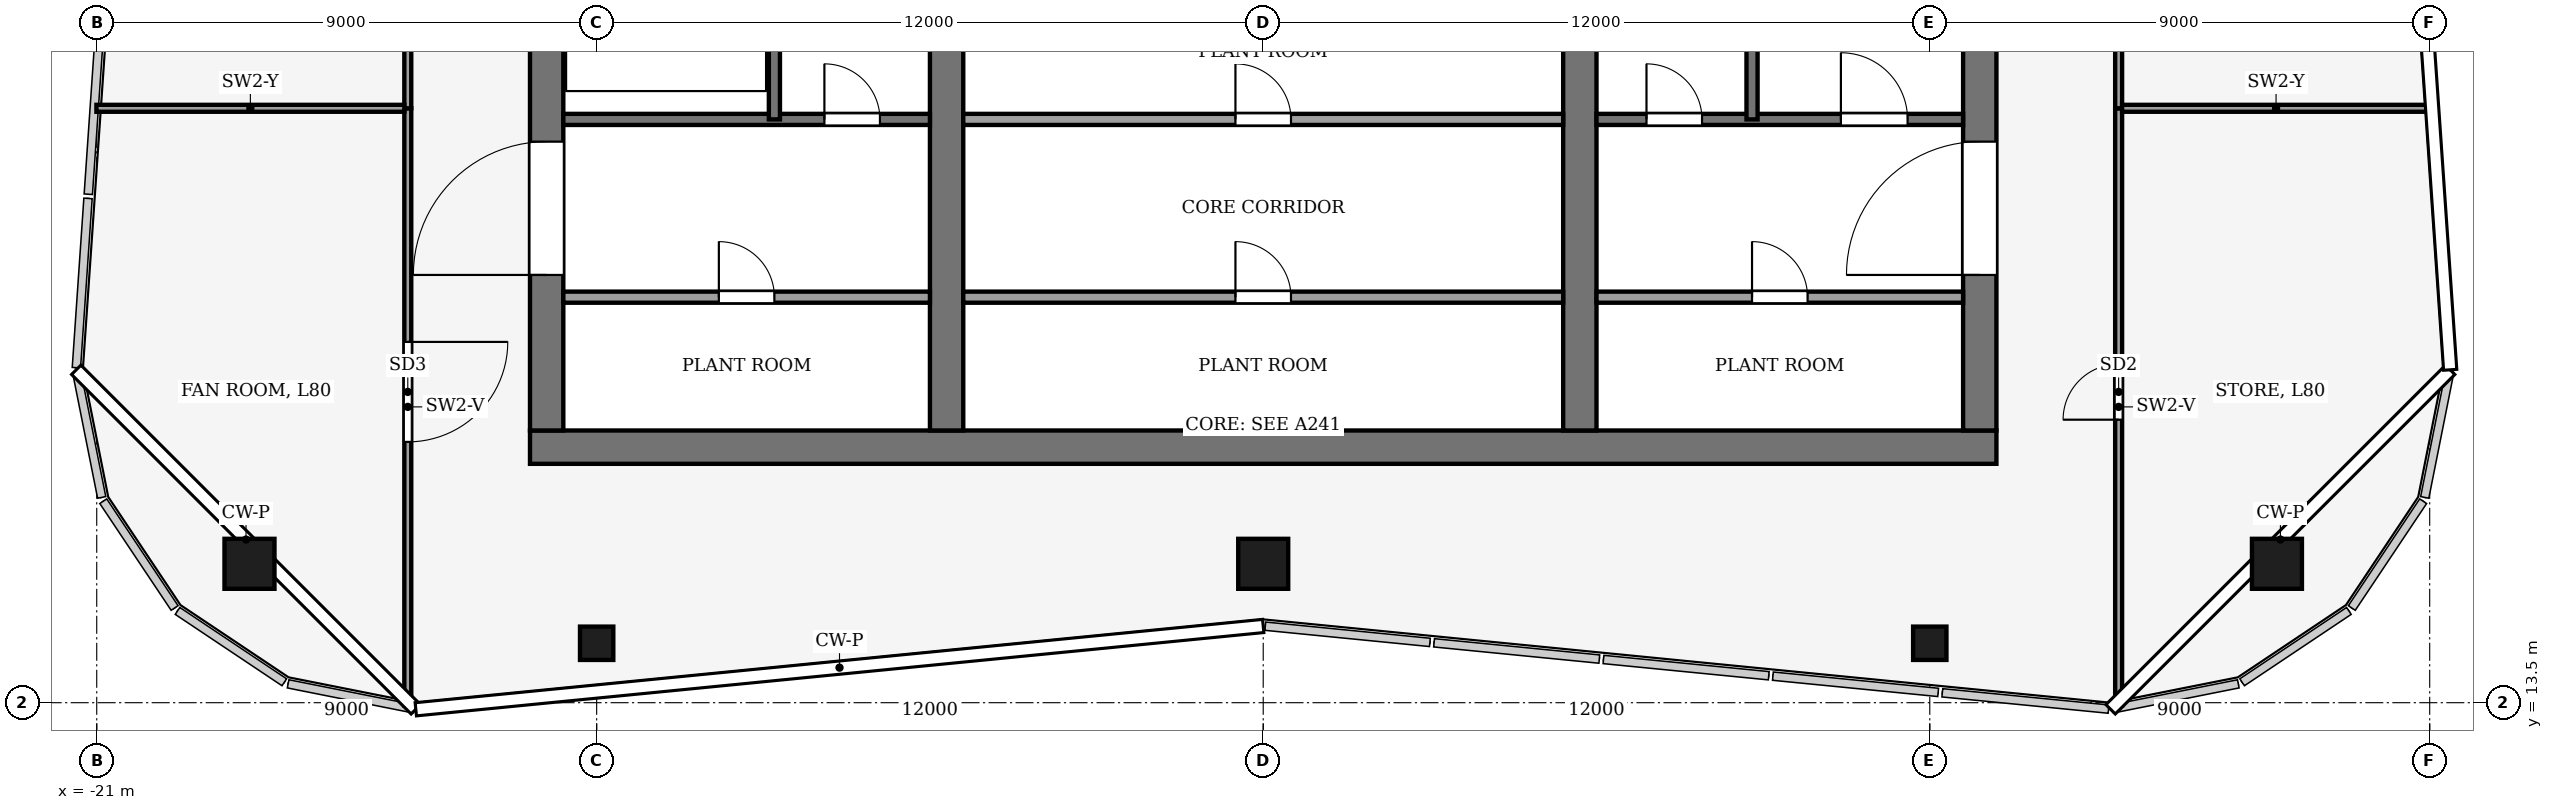
"""IFC4 building model, lengths in metres.
Left out: names, types, materials, properties, quantities, classifications, styles, units other than length and angle.
Written with IfcOpenShell. Run it as: python <this file> out.ifc"""

import sys

from ifc_helpers import new_model, si_unit, direction, frame, frame_2d, origin, origin_2d, place, context, subcontext, project, spatial, rectangle, hollow_rectangle, extrude, element, fill, save


model = new_model("IFC4")
c1 = context("Model", 3, precision=1e-05, world=origin(), true_north=direction((0.0, 1.0)))
c2 = subcontext(c1, "Body", "Model", "MODEL_VIEW")
j1 = project(units=[si_unit("LENGTHUNIT", "METRE"), si_unit("PLANEANGLEUNIT", "RADIAN")], contexts=[c1])
p1 = place(None, origin())
s1 = spatial("IfcSite", under=j1, at=p1, CompositionType="ELEMENT")
p2 = place(p1, origin())
s2 = spatial("IfcBuilding", under=s1, at=p2, CompositionType="ELEMENT")
p3 = place(p2, frame((0.0, 0.0, 354.5)))
s3 = spatial("IfcBuildingStorey", under=s2, at=p3, CompositionType="ELEMENT", Elevation=354.5)
p4 = place(p3, frame((-13.2, 18.1, -0.15), z_axis=(0.0, 0.0, 1.0), x_axis=(1.0, 0.0, 0.0)))
e1 = element("IfcWall", 1, at=p4, inside=s3, PredefinedType="SHEAR", context=c2, shape_type="SweptSolid", body=[
    extrude(rectangle(XDim=26.4, YDim=0.6, at=frame_2d((13.2, 0.0))), origin(), (0.0, 0.0, 1.0), 5.0),
])
p5 = place(p3, frame((-12.9, 18.4, -0.15), z_axis=(0.0, 0.0, 1.0), x_axis=(0.0, 1.0, 0.0)))
e2 = element("IfcWall", 2, at=p5, inside=s3, PredefinedType="SHEAR", context=c2, shape_type="SweptSolid", body=[
    extrude(rectangle(XDim=19.2, YDim=0.6, at=frame_2d((9.6, 0.0))), origin(), (0.0, 0.0, 1.0), 5.0),
])
p6 = place(p5, frame((2.8, 0.0, 0.15)))
e3 = element("IfcOpeningElement", 3, at=p6, cuts=e2, PredefinedType="OPENING", context=c2, shape_type="SweptSolid", body=[
    extrude(rectangle(XDim=2.4, YDim=2.4, at=frame_2d((1.2, 1.2))), frame((0.0, 0.31, 0.0), z_axis=(0.0, -1.0, 0.0), x_axis=(1.0, 0.0, 0.0)), (0.0, 0.0, 1.0), 0.62),
])
p7 = place(p5, frame((13.4, 0.0, 0.15)))
e4 = element("IfcOpeningElement", 4, at=p7, cuts=e2, PredefinedType="OPENING", context=c2, shape_type="SweptSolid", body=[
    extrude(rectangle(XDim=1.4, YDim=2.2, at=frame_2d((0.7, 1.1))), frame((0.0, 0.31, 0.0), z_axis=(0.0, -1.0, 0.0), x_axis=(1.0, 0.0, 0.0)), (0.0, 0.0, 1.0), 0.62),
])
p8 = place(p3, frame((12.9, 18.4, -0.15), z_axis=(0.0, 0.0, 1.0), x_axis=(0.0, 1.0, 0.0)))
e5 = element("IfcWall", 5, at=p8, inside=s3, PredefinedType="SHEAR", context=c2, shape_type="SweptSolid", body=[
    extrude(rectangle(XDim=19.2, YDim=0.6, at=frame_2d((9.6, 0.0))), origin(), (0.0, 0.0, 1.0), 5.0),
])
p9 = place(p8, frame((2.8, 0.0, 0.15)))
e6 = element("IfcOpeningElement", 6, at=p9, cuts=e5, PredefinedType="OPENING", context=c2, shape_type="SweptSolid", body=[
    extrude(rectangle(XDim=2.4, YDim=2.4, at=frame_2d((1.2, 1.2))), frame((0.0, 0.31, 0.0), z_axis=(0.0, -1.0, 0.0), x_axis=(1.0, 0.0, 0.0)), (0.0, 0.0, 1.0), 0.62),
])
p10 = place(p8, frame((13.3, 0.0, 0.15)))
e7 = element("IfcOpeningElement", 7, at=p10, cuts=e5, PredefinedType="OPENING", context=c2, shape_type="SweptSolid", body=[
    extrude(rectangle(XDim=2.4, YDim=2.4, at=frame_2d((1.2, 1.2))), frame((0.0, 0.31, 0.0), z_axis=(0.0, -1.0, 0.0), x_axis=(1.0, 0.0, 0.0)), (0.0, 0.0, 1.0), 0.62),
])
p11 = place(p3, frame((-5.7, 18.4, -0.15), z_axis=(0.0, 0.0, 1.0), x_axis=(0.0, 1.0, 0.0)))
e8 = element("IfcWall", 8, at=p11, inside=s3, PredefinedType="SHEAR", context=c2, shape_type="SweptSolid", body=[
    extrude(rectangle(XDim=19.2, YDim=0.6, at=frame_2d((9.6, 0.0))), origin(), (0.0, 0.0, 1.0), 5.0),
])
p12 = place(p11, frame((8.35, 0.0, 0.15)))
e9 = element("IfcOpeningElement", 9, at=p12, cuts=e8, PredefinedType="OPENING", context=c2, shape_type="SweptSolid", body=[
    extrude(rectangle(XDim=0.9, YDim=2.1, at=frame_2d((0.45, 1.05))), frame((0.0, 0.31, 0.0), z_axis=(0.0, -1.0, 0.0), x_axis=(1.0, 0.0, 0.0)), (0.0, 0.0, 1.0), 0.62),
])
p13 = place(p3, frame((5.7, 18.4, -0.15), z_axis=(0.0, 0.0, 1.0), x_axis=(0.0, 1.0, 0.0)))
e10 = element("IfcWall", 10, at=p13, inside=s3, PredefinedType="SHEAR", context=c2, shape_type="SweptSolid", body=[
    extrude(rectangle(XDim=19.2, YDim=0.6, at=frame_2d((9.6, 0.0))), origin(), (0.0, 0.0, 1.0), 5.0),
])
p14 = place(p13, frame((13.3, 0.0, 0.15)))
e11 = element("IfcOpeningElement", 11, at=p14, cuts=e10, PredefinedType="OPENING", context=c2, shape_type="SweptSolid", body=[
    extrude(rectangle(XDim=2.4, YDim=2.4, at=frame_2d((1.2, 1.2))), frame((0.0, 0.31, 0.0), z_axis=(0.0, -1.0, 0.0), x_axis=(1.0, 0.0, 0.0)), (0.0, 0.0, 1.0), 0.62),
])
for number, where, z_axis, x_axis in (
    (12, (18.25, 16.0, 0.0), (0.0, 0.0, 1.0), (1.0, 0.0, 0.0)),
    (13, (0.0, 16.0, 0.0), (0.0, 0.0, 1.0), (1.0, 0.0, 0.0)),
    (14, (-18.25, 16.0, 0.0), (0.0, 0.0, 1.0), (1.0, 0.0, 0.0)),
):
    element("IfcColumn", number, at=place(p3, frame(where, z_axis=z_axis, x_axis=x_axis)), inside=s3, PredefinedType="COLUMN", context=c2, shape_type="SweptSolid", body=[
        extrude(hollow_rectangle(XDim=0.9, YDim=0.9, WallThickness=0.04, at=origin_2d()), origin(), (0.0, 0.0, 1.0), 5.0),
    ])
for number, where, z_axis, x_axis in (
    (15, (-12.0, 14.57, 0.0), (0.0, 0.0, 1.0), (1.0, 0.0, 0.0)),
    (16, (12.0, 14.57, 0.0), (0.0, 0.0, 1.0), (1.0, 0.0, 0.0)),
):
    element("IfcColumn", number, at=place(p3, frame(where, z_axis=z_axis, x_axis=x_axis)), inside=s3, PredefinedType="COLUMN", context=c2, shape_type="SweptSolid", body=[
        extrude(hollow_rectangle(XDim=0.6, YDim=0.6, WallThickness=0.025, at=origin_2d()), origin(), (0.0, 0.0, 1.0), 5.0),
    ])
p15 = place(p3, frame((-12.6, 20.8, 0.0), z_axis=(0.0, 0.0, 1.0), x_axis=(1.0, 0.0, 0.0)))
e17 = element("IfcWall", 17, at=p15, inside=s3, PredefinedType="PARTITIONING", context=c2, shape_type="SweptSolid", body=[
    extrude(rectangle(XDim=6.6, YDim=0.2, at=frame_2d((3.3, 0.0))), origin(), (0.0, 0.0, 1.0), 4.85),
])
p16 = place(p15, frame((2.8, 0.0, 0.0)))
e18 = element("IfcOpeningElement", 18, at=p16, cuts=e17, PredefinedType="OPENING", context=c2, shape_type="SweptSolid", body=[
    extrude(rectangle(XDim=1.0, YDim=2.1, at=frame_2d((0.5, 1.05))), frame((0.0, 0.11, 0.0), z_axis=(0.0, -1.0, 0.0), x_axis=(1.0, 0.0, 0.0)), (0.0, 0.0, 1.0), 0.22),
])
p17 = place(p3, frame((-5.4, 20.8, 0.0), z_axis=(0.0, 0.0, 1.0), x_axis=(1.0, 0.0, 0.0)))
e19 = element("IfcWall", 19, at=p17, inside=s3, PredefinedType="PARTITIONING", context=c2, shape_type="SweptSolid", body=[
    extrude(rectangle(XDim=10.8, YDim=0.2, at=frame_2d((5.4, 0.0))), origin(), (0.0, 0.0, 1.0), 4.85),
])
p18 = place(p17, frame((4.9, 0.0, 0.0)))
e20 = element("IfcOpeningElement", 20, at=p18, cuts=e19, PredefinedType="OPENING", context=c2, shape_type="SweptSolid", body=[
    extrude(rectangle(XDim=1.0, YDim=2.1, at=frame_2d((0.5, 1.05))), frame((0.0, 0.11, 0.0), z_axis=(0.0, -1.0, 0.0), x_axis=(1.0, 0.0, 0.0)), (0.0, 0.0, 1.0), 0.22),
])
p19 = place(p3, frame((6.0, 20.8, 0.0), z_axis=(0.0, 0.0, 1.0), x_axis=(1.0, 0.0, 0.0)))
e21 = element("IfcWall", 21, at=p19, inside=s3, PredefinedType="PARTITIONING", context=c2, shape_type="SweptSolid", body=[
    extrude(rectangle(XDim=6.6, YDim=0.2, at=frame_2d((3.3, 0.0))), origin(), (0.0, 0.0, 1.0), 4.85),
])
p20 = place(p19, frame((2.8, 0.0, 0.0)))
e22 = element("IfcOpeningElement", 22, at=p20, cuts=e21, PredefinedType="OPENING", context=c2, shape_type="SweptSolid", body=[
    extrude(rectangle(XDim=1.0, YDim=2.1, at=frame_2d((0.5, 1.05))), frame((0.0, 0.11, 0.0), z_axis=(0.0, -1.0, 0.0), x_axis=(1.0, 0.0, 0.0)), (0.0, 0.0, 1.0), 0.22),
])
p21 = place(p3, frame((-12.6, 24.0, 0.0), z_axis=(0.0, 0.0, 1.0), x_axis=(1.0, 0.0, 0.0)))
e23 = element("IfcWall", 23, at=p21, inside=s3, PredefinedType="PARTITIONING", context=c2, shape_type="SweptSolid", body=[
    extrude(rectangle(XDim=6.6, YDim=0.2, at=frame_2d((3.3, 0.0))), origin(), (0.0, 0.0, 1.0), 4.85),
])
p22 = place(p21, frame((4.7, 0.0, 0.0)))
e24 = element("IfcOpeningElement", 24, at=p22, cuts=e23, PredefinedType="OPENING", context=c2, shape_type="SweptSolid", body=[
    extrude(rectangle(XDim=1.0, YDim=2.1, at=frame_2d((0.5, 1.05))), frame((0.0, 0.11, 0.0), z_axis=(0.0, -1.0, 0.0), x_axis=(1.0, 0.0, 0.0)), (0.0, 0.0, 1.0), 0.22),
])
p23 = place(p3, frame((-5.4, 24.0, 0.0), z_axis=(0.0, 0.0, 1.0), x_axis=(1.0, 0.0, 0.0)))
e25 = element("IfcWall", 25, at=p23, inside=s3, PredefinedType="PARTITIONING", context=c2, shape_type="SweptSolid", body=[
    extrude(rectangle(XDim=10.8, YDim=0.2, at=frame_2d((5.4, 0.0))), origin(), (0.0, 0.0, 1.0), 4.85),
])
p24 = place(p23, frame((4.9, 0.0, 0.0)))
e26 = element("IfcOpeningElement", 26, at=p24, cuts=e25, PredefinedType="OPENING", context=c2, shape_type="SweptSolid", body=[
    extrude(rectangle(XDim=1.0, YDim=2.1, at=frame_2d((0.5, 1.05))), frame((0.0, 0.11, 0.0), z_axis=(0.0, -1.0, 0.0), x_axis=(1.0, 0.0, 0.0)), (0.0, 0.0, 1.0), 0.22),
])
p25 = place(p3, frame((6.0, 24.0, 0.0), z_axis=(0.0, 0.0, 1.0), x_axis=(1.0, 0.0, 0.0)))
e27 = element("IfcWall", 27, at=p25, inside=s3, PredefinedType="PARTITIONING", context=c2, shape_type="SweptSolid", body=[
    extrude(rectangle(XDim=6.6, YDim=0.2, at=frame_2d((3.3, 0.0))), origin(), (0.0, 0.0, 1.0), 4.85),
])
p26 = place(p25, frame((0.9, 0.0, 0.0)))
e28 = element("IfcOpeningElement", 28, at=p26, cuts=e27, PredefinedType="OPENING", context=c2, shape_type="SweptSolid", body=[
    extrude(rectangle(XDim=1.0, YDim=2.1, at=frame_2d((0.5, 1.05))), frame((0.0, 0.11, 0.0), z_axis=(0.0, -1.0, 0.0), x_axis=(1.0, 0.0, 0.0)), (0.0, 0.0, 1.0), 0.22),
])
p27 = place(p25, frame((4.4, 0.0, 0.0)))
e29 = element("IfcOpeningElement", 29, at=p27, cuts=e27, PredefinedType="OPENING", context=c2, shape_type="SweptSolid", body=[
    extrude(rectangle(XDim=1.2, YDim=2.2, at=frame_2d((0.6, 1.1))), frame((0.0, 0.11, 0.0), z_axis=(0.0, -1.0, 0.0), x_axis=(1.0, 0.0, 0.0)), (0.0, 0.0, 1.0), 0.22),
])
for number, where, z_axis, x_axis in (
    (30, (-8.8, 24.0, 0.0), (0.0, 0.0, 1.0), (0.0, 1.0, 0.0)),
    (31, (8.8, 24.0, 0.0), (0.0, 0.0, 1.0), (0.0, 1.0, 0.0)),
):
    element("IfcWall", number, at=place(p3, frame(where, z_axis=z_axis, x_axis=x_axis)), inside=s3, PredefinedType="PARTITIONING", context=c2, shape_type="SweptSolid", body=[
        extrude(rectangle(XDim=7.4, YDim=0.2, at=frame_2d((3.7, 0.0))), origin(), (0.0, 0.0, 1.0), 4.85),
    ])
p28 = place(p3, frame((-15.4, 24.2, 0.0), z_axis=(0.0, 0.0, 1.0), x_axis=(0.0, -1.0, 0.0)))
e32 = element("IfcWall", 32, at=p28, inside=s3, PredefinedType="PARTITIONING", context=c2, shape_type="SweptSolid", body=[
    extrude(rectangle(XDim=10.75, YDim=0.125, at=frame_2d((5.375, 0.0))), origin(), (0.0, 0.0, 1.0), 3.812),
])
p29 = place(p28, frame((4.206, 0.0, 0.0)))
e33 = element("IfcOpeningElement", 33, at=p29, cuts=e32, PredefinedType="OPENING", context=c2, shape_type="SweptSolid", body=[
    extrude(rectangle(XDim=1.8, YDim=2.4, at=frame_2d((0.9, 1.2))), frame((0.0, 0.073, 0.0), z_axis=(0.0, -1.0, 0.0), x_axis=(1.0, 0.0, 0.0)), (0.0, 0.0, 1.0), 0.145),
])
p30 = place(p3, frame((-15.4, 34.4, 0.0), z_axis=(0.0, 0.0, 1.0), x_axis=(0.0, -1.0, 0.0)))
e34 = element("IfcWall", 34, at=p30, inside=s3, PredefinedType="PARTITIONING", context=c2, shape_type="SweptSolid", body=[
    extrude(rectangle(XDim=10.2, YDim=0.125, at=frame_2d((5.1, 0.0))), origin(), (0.0, 0.0, 1.0), 4.52),
])
p31 = place(p30, frame((4.6, 0.0, 0.0)))
e35 = element("IfcOpeningElement", 35, at=p31, cuts=e34, PredefinedType="OPENING", context=c2, shape_type="SweptSolid", body=[
    extrude(rectangle(XDim=1.0, YDim=2.1, at=frame_2d((0.5, 1.05))), frame((0.0, 0.073, 0.0), z_axis=(0.0, -1.0, 0.0), x_axis=(1.0, 0.0, 0.0)), (0.0, 0.0, 1.0), 0.145),
])
p32 = place(p3, frame((15.4, 13.45, 0.0), z_axis=(0.0, 0.0, 1.0), x_axis=(0.0, 1.0, 0.0)))
e36 = element("IfcWall", 36, at=p32, inside=s3, PredefinedType="PARTITIONING", context=c2, shape_type="SweptSolid", body=[
    extrude(rectangle(XDim=10.75, YDim=0.125, at=frame_2d((5.375, 0.0))), origin(), (0.0, 0.0, 1.0), 3.812),
])
p33 = place(p32, frame((5.145, 0.0, 0.0)))
e37 = element("IfcOpeningElement", 37, at=p33, cuts=e36, PredefinedType="OPENING", context=c2, shape_type="SweptSolid", body=[
    extrude(rectangle(XDim=1.0, YDim=2.1, at=frame_2d((0.5, 1.05))), frame((0.0, 0.073, 0.0), z_axis=(0.0, -1.0, 0.0), x_axis=(1.0, 0.0, 0.0)), (0.0, 0.0, 1.0), 0.145),
])
p34 = place(p3, frame((15.4, 24.2, 0.0), z_axis=(0.0, 0.0, 1.0), x_axis=(0.0, 1.0, 0.0)))
e38 = element("IfcWall", 38, at=p34, inside=s3, PredefinedType="PARTITIONING", context=c2, shape_type="SweptSolid", body=[
    extrude(rectangle(XDim=10.2, YDim=0.125, at=frame_2d((5.1, 0.0))), origin(), (0.0, 0.0, 1.0), 4.52),
])
p35 = place(p34, frame((4.2, 0.0, 0.0)))
e39 = element("IfcOpeningElement", 39, at=p35, cuts=e38, PredefinedType="OPENING", context=c2, shape_type="SweptSolid", body=[
    extrude(rectangle(XDim=1.8, YDim=2.4, at=frame_2d((0.9, 1.2))), frame((0.0, 0.073, 0.0), z_axis=(0.0, -1.0, 0.0), x_axis=(1.0, 0.0, 0.0)), (0.0, 0.0, 1.0), 0.145),
])
for number, where, z_axis, x_axis in (
    (40, (-21.006, 24.2, 0.0), (0.0, 0.0, 1.0), (1.0, 0.0, 0.0)),
    (41, (15.462, 24.2, 0.0), (0.0, 0.0, 1.0), (1.0, 0.0, 0.0)),
):
    element("IfcWall", number, at=place(p3, frame(where, z_axis=z_axis, x_axis=x_axis)), inside=s3, PredefinedType="PARTITIONING", context=c2, shape_type="SweptSolid", body=[
        extrude(rectangle(XDim=5.543, YDim=0.125, at=frame_2d((2.772, 0.0))), origin(), (0.0, 0.0, 1.0), 4.02),
    ])
p36 = place(p18, origin())
e42 = element("IfcDoor", 42, at=p36, inside=s3, OperationType="SINGLE_SWING_LEFT", PredefinedType="DOOR", context=c2, shape_type="SweptSolid", body=[
    extrude(rectangle(XDim=1.0, YDim=2.1, at=frame_2d((0.5, 1.05))), frame((0.0, 0.025, 0.0), z_axis=(0.0, -1.0, 0.0), x_axis=(1.0, 0.0, 0.0)), (0.0, 0.0, 1.0), 0.05),
])
fill(e20, e42)
p37 = place(p24, origin())
e43 = element("IfcDoor", 43, at=p37, inside=s3, OperationType="SINGLE_SWING_RIGHT", PredefinedType="DOOR", context=c2, shape_type="SweptSolid", body=[
    extrude(rectangle(XDim=1.0, YDim=2.1, at=frame_2d((0.5, 1.05))), frame((0.0, 0.025, 0.0), z_axis=(0.0, -1.0, 0.0), x_axis=(1.0, 0.0, 0.0)), (0.0, 0.0, 1.0), 0.05),
])
fill(e26, e43)
p38 = place(p16, origin())
e44 = element("IfcDoor", 44, at=p38, inside=s3, OperationType="SINGLE_SWING_RIGHT", PredefinedType="DOOR", context=c2, shape_type="SweptSolid", body=[
    extrude(rectangle(XDim=1.0, YDim=2.1, at=frame_2d((0.5, 1.05))), frame((0.0, 0.025, 0.0), z_axis=(0.0, -1.0, 0.0), x_axis=(1.0, 0.0, 0.0)), (0.0, 0.0, 1.0), 0.05),
])
fill(e18, e44)
p39 = place(p20, origin())
e45 = element("IfcDoor", 45, at=p39, inside=s3, OperationType="SINGLE_SWING_LEFT", PredefinedType="DOOR", context=c2, shape_type="SweptSolid", body=[
    extrude(rectangle(XDim=1.0, YDim=2.1, at=frame_2d((0.5, 1.05))), frame((0.0, 0.025, 0.0), z_axis=(0.0, -1.0, 0.0), x_axis=(1.0, 0.0, 0.0)), (0.0, 0.0, 1.0), 0.05),
])
fill(e22, e45)
p40 = place(p22, origin())
e46 = element("IfcDoor", 46, at=p40, inside=s3, OperationType="SINGLE_SWING_LEFT", PredefinedType="DOOR", context=c2, shape_type="SweptSolid", body=[
    extrude(rectangle(XDim=1.0, YDim=2.1, at=frame_2d((0.5, 1.05))), frame((0.0, 0.025, 0.0), z_axis=(0.0, -1.0, 0.0), x_axis=(1.0, 0.0, 0.0)), (0.0, 0.0, 1.0), 0.05),
])
fill(e24, e46)
p41 = place(p26, origin())
e47 = element("IfcDoor", 47, at=p41, inside=s3, OperationType="SINGLE_SWING_RIGHT", PredefinedType="DOOR", context=c2, shape_type="SweptSolid", body=[
    extrude(rectangle(XDim=1.0, YDim=2.1, at=frame_2d((0.5, 1.05))), frame((0.0, 0.025, 0.0), z_axis=(0.0, -1.0, 0.0), x_axis=(1.0, 0.0, 0.0)), (0.0, 0.0, 1.0), 0.05),
])
fill(e28, e47)
p42 = place(p27, origin())
e48 = element("IfcDoor", 48, at=p42, inside=s3, OperationType="SINGLE_SWING_RIGHT", PredefinedType="DOOR", context=c2, shape_type="SweptSolid", body=[
    extrude(rectangle(XDim=1.2, YDim=2.2, at=frame_2d((0.6, 1.1))), frame((0.0, 0.025, 0.0), z_axis=(0.0, -1.0, 0.0), x_axis=(1.0, 0.0, 0.0)), (0.0, 0.0, 1.0), 0.05),
])
fill(e29, e48)
p43 = place(p6, origin())
e49 = element("IfcDoor", 49, at=p43, inside=s3, OperationType="DOUBLE_DOOR_SINGLE_SWING", PredefinedType="DOOR", context=c2, shape_type="SweptSolid", body=[
    extrude(rectangle(XDim=2.4, YDim=2.4, at=frame_2d((1.2, 1.2))), frame((0.0, 0.025, 0.0), z_axis=(0.0, -1.0, 0.0), x_axis=(1.0, 0.0, 0.0)), (0.0, 0.0, 1.0), 0.05),
])
fill(e3, e49)
p44 = place(p9, origin())
e50 = element("IfcDoor", 50, at=p44, inside=s3, OperationType="DOUBLE_DOOR_SINGLE_SWING", PredefinedType="DOOR", context=c2, shape_type="SweptSolid", body=[
    extrude(rectangle(XDim=2.4, YDim=2.4, at=frame_2d((1.2, 1.2))), frame((0.0, 0.025, 0.0), z_axis=(0.0, -1.0, 0.0), x_axis=(1.0, 0.0, 0.0)), (0.0, 0.0, 1.0), 0.05),
])
fill(e6, e50)
p45 = place(p29, origin())
e51 = element("IfcDoor", 51, at=p45, inside=s3, OperationType="DOUBLE_DOOR_SINGLE_SWING", PredefinedType="DOOR", context=c2, shape_type="SweptSolid", body=[
    extrude(rectangle(XDim=1.8, YDim=2.4, at=frame_2d((0.9, 1.2))), frame((0.0, 0.025, 0.0), z_axis=(0.0, -1.0, 0.0), x_axis=(1.0, 0.0, 0.0)), (0.0, 0.0, 1.0), 0.05),
])
fill(e33, e51)
p46 = place(p33, origin())
e52 = element("IfcDoor", 52, at=p46, inside=s3, OperationType="SINGLE_SWING_RIGHT", PredefinedType="DOOR", context=c2, shape_type="SweptSolid", body=[
    extrude(rectangle(XDim=1.0, YDim=2.1, at=frame_2d((0.5, 1.05))), frame((0.0, 0.025, 0.0), z_axis=(0.0, -1.0, 0.0), x_axis=(1.0, 0.0, 0.0)), (0.0, 0.0, 1.0), 0.05),
])
fill(e37, e52)
save(model, sys.argv[1])
